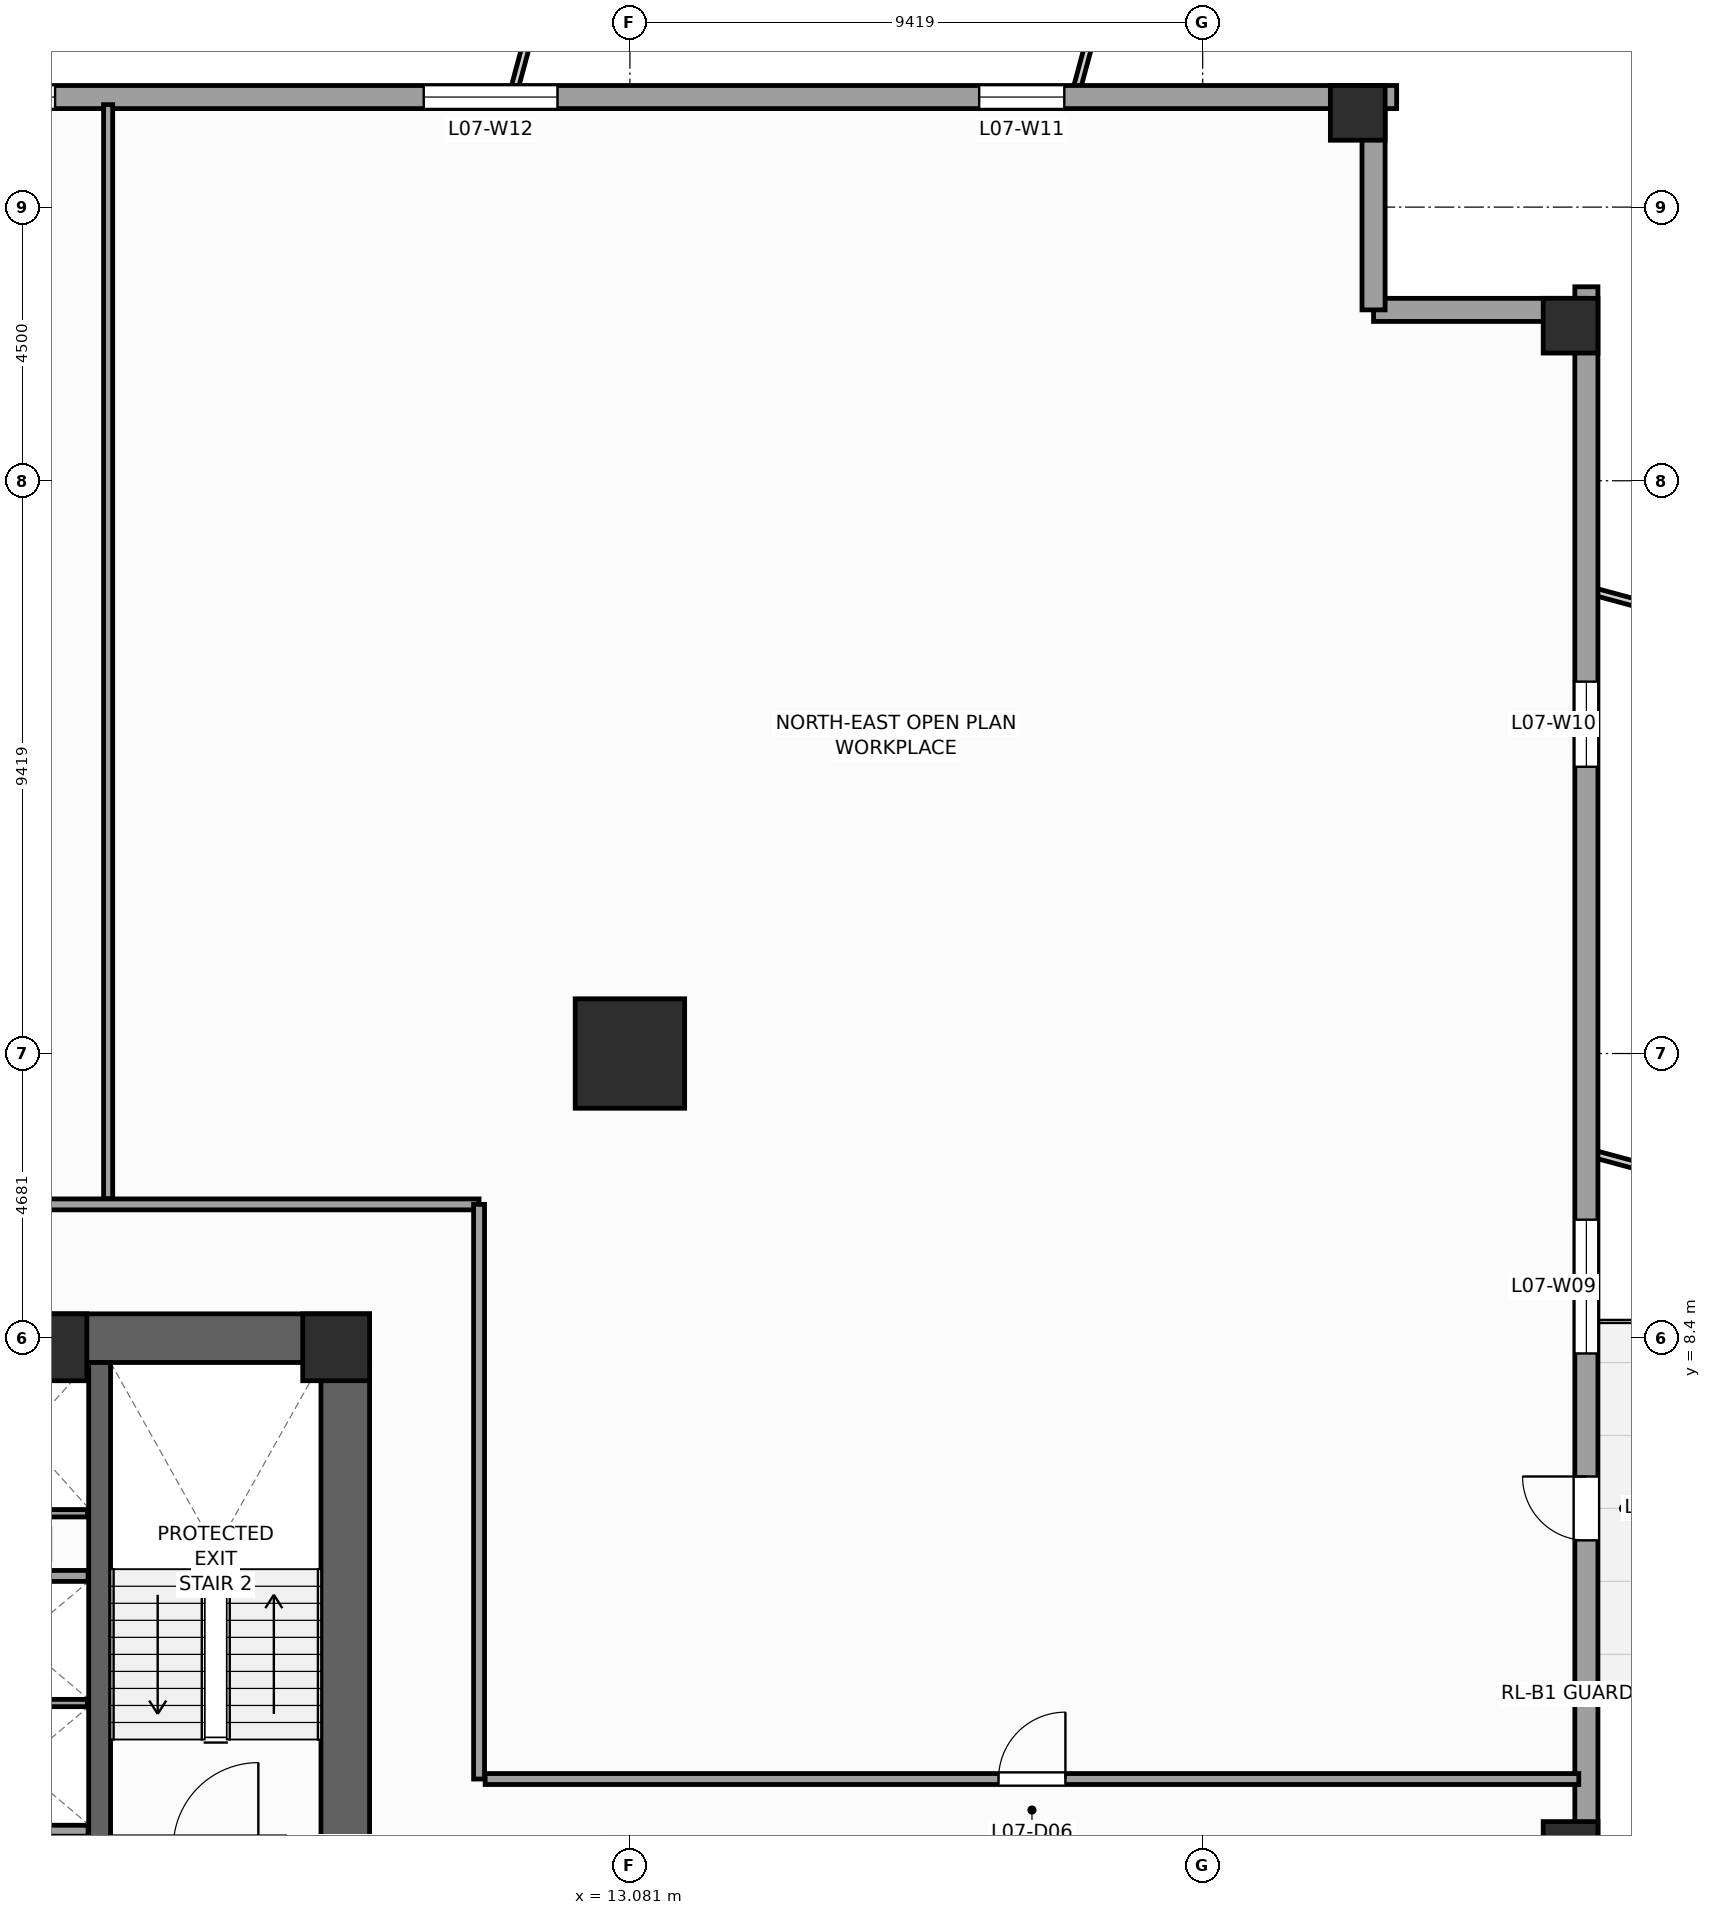
"""IFC4 building model, lengths in metres.
Left out: names, types, materials, properties, quantities, classifications, styles, units other than length and angle.
Written with IfcOpenShell. Run it as: python <this file> out.ifc"""

import sys

from ifc_helpers import new_model, si_unit, direction, frame, frame_2d, origin, origin_2d, place, context, subcontext, project, spatial, rectangle, extrude, source, transform, mapped, element, fill, save


model = new_model("IFC4")
c1 = context("Model", 3, precision=1e-05, world=origin(), true_north=direction((0.0, 1.0)))
c2 = subcontext(c1, "Body", "Model", "MODEL_VIEW")
j1 = project(units=[si_unit("LENGTHUNIT", "METRE"), si_unit("PLANEANGLEUNIT", "RADIAN")], contexts=[c1])
p1 = place(None, origin())
s1 = spatial("IfcSite", under=j1, at=p1, CompositionType="ELEMENT")
p2 = place(p1, origin())
s2 = spatial("IfcBuilding", under=s1, at=p2, CompositionType="ELEMENT")
p3 = place(p2, frame((0.0, 0.0, 34.0)))
s3 = spatial("IfcBuildingStorey", under=s2, at=p3, CompositionType="ELEMENT", Elevation=34.0)
p4 = place(p3, frame((-8.8, 8.4, 0.0), z_axis=(0.0, 0.0, 1.0), x_axis=(1.0, 0.0, 0.0)))
e1 = element("IfcWall", 1, at=p4, inside=s3, PredefinedType="SHEAR", context=c2, shape_type="SweptSolid", body=[
    extrude(rectangle(XDim=17.6, YDim=0.8, at=frame_2d((8.8, 0.0))), origin(), (0.0, 0.0, 1.0), 4.0),
])
p5 = place(p3, frame((8.4, -8.0, 0.0), z_axis=(0.0, 0.0, 1.0), x_axis=(0.0, 1.0, 0.0)))
e2 = element("IfcWall", 2, at=p5, inside=s3, PredefinedType="SHEAR", context=c2, shape_type="SweptSolid", body=[
    extrude(rectangle(XDim=16.0, YDim=0.8, at=frame_2d((8.0, 0.0))), origin(), (0.0, 0.0, 1.0), 4.0),
])
p6 = place(p5, frame((4.69, 0.0, 0.0)))
e3 = element("IfcOpeningElement", 3, at=p6, cuts=e2, PredefinedType="OPENING", context=c2, shape_type="SweptSolid", body=[
    extrude(rectangle(XDim=1.3, YDim=2.2, at=frame_2d((0.65, 1.1))), frame((0.0, 0.41, 0.0), z_axis=(0.0, -1.0, 0.0), x_axis=(1.0, 0.0, 0.0)), (0.0, 0.0, 1.0), 0.82),
])
p7 = place(p3, frame((4.36, -8.0, 0.0), z_axis=(0.0, 0.0, 1.0), x_axis=(0.0, 1.0, 0.0)))
e4 = element("IfcWall", 4, at=p7, inside=s3, PredefinedType="SHEAR", context=c2, shape_type="SweptSolid", body=[
    extrude(rectangle(XDim=16.0, YDim=0.36, at=frame_2d((8.0, 0.0))), origin(), (0.0, 0.0, 1.0), 4.0),
])
m1 = source(origin(), c2, "Body", "SweptSolid", [
    extrude(rectangle(XDim=1.1, YDim=1.1, at=origin_2d()), origin(), (0.0, 0.0, 1.0), 4.0),
])
for number, where, z_axis, x_axis in (
    (5, (8.25, 8.25, 0.0), (0.0, 0.0, 1.0), (1.0, 0.0, 0.0)),
    (6, (3.6, 8.25, 0.0), (0.0, 0.0, 1.0), (1.0, 0.0, 0.0)),
):
    element("IfcColumn", number, at=place(p3, frame(where, z_axis=z_axis, x_axis=x_axis)), inside=s3, PredefinedType="PILASTER", context=c2, shape_type="MappedRepresentation", body=[
        mapped(m1, transform((0.0, 0.0, 0.0), scale=1.0)),
    ])
m2 = source(origin(), c2, "Body", "SweptSolid", [
    extrude(rectangle(XDim=1.8, YDim=1.8, at=origin_2d()), origin(), (0.0, 0.0, 1.0), 4.0),
])
p8 = place(p3, frame((13.081, 13.081, 0.0), z_axis=(0.0, 0.0, 1.0), x_axis=(1.0, 0.0, 0.0)))
e7 = element("IfcColumn", 7, at=p8, inside=s3, PredefinedType="COLUMN", context=c2, shape_type="MappedRepresentation", body=[
    mapped(m2, transform((0.0, 0.0, 0.0), scale=1.0)),
])
m3 = source(origin(), c2, "Body", "SweptSolid", [
    extrude(rectangle(XDim=0.9, YDim=0.9, at=origin_2d()), origin(), (0.0, 0.0, 1.0), 4.0),
])
for number, where, z_axis, x_axis in (
    (8, (28.55, 0.0, 0.0), (0.0, 0.0, 1.0), (1.0, 0.0, 0.0)),
    (9, (28.55, 25.05, 0.0), (0.0, 0.0, 1.0), (1.0, 0.0, 0.0)),
    (10, (25.05, 28.55, 0.0), (0.0, 0.0, 1.0), (1.0, 0.0, 0.0)),
):
    element("IfcColumn", number, at=place(p3, frame(where, z_axis=z_axis, x_axis=x_axis)), inside=s3, PredefinedType="COLUMN", context=c2, shape_type="MappedRepresentation", body=[
        mapped(m3, transform((0.0, 0.0, 0.0), scale=1.0)),
    ])
p9 = place(p3, frame((28.81, -25.69, 0.0), z_axis=(0.0, 0.0, 1.0), x_axis=(0.0, 1.0, 0.0)))
e11 = element("IfcWall", 11, at=p9, inside=s3, PredefinedType="STANDARD", context=c2, shape_type="SweptSolid", body=[
    extrude(rectangle(XDim=51.38, YDim=0.38, at=frame_2d((25.69, 0.0))), origin(), (0.0, 0.0, 1.0), 3.12),
])
p10 = place(p9, frame((30.765, 0.0, 0.0)))
e12 = element("IfcOpeningElement", 12, at=p10, cuts=e11, PredefinedType="OPENING", context=c2, shape_type="SweptSolid", body=[
    extrude(rectangle(XDim=1.05, YDim=2.25, at=frame_2d((0.525, 1.125))), frame((0.0, 0.2, 0.0), z_axis=(0.0, -1.0, 0.0), x_axis=(1.0, 0.0, 0.0)), (0.0, 0.0, 1.0), 0.4),
])
p11 = place(p9, frame((5.466, 0.0, 0.49)))
e13 = element("IfcOpeningElement", 13, at=p11, cuts=e11, PredefinedType="OPENING", context=c2, shape_type="SweptSolid", body=[
    extrude(rectangle(XDim=1.4, YDim=2.4, at=frame_2d((0.7, 1.2))), frame((0.0, 0.2, 0.0), z_axis=(0.0, -1.0, 0.0), x_axis=(1.0, 0.0, 0.0)), (0.0, 0.0, 1.0), 0.4),
])
p12 = place(p9, frame((13.8, 0.0, 0.49)))
e14 = element("IfcOpeningElement", 14, at=p12, cuts=e11, PredefinedType="OPENING", context=c2, shape_type="SweptSolid", body=[
    extrude(rectangle(XDim=2.2, YDim=2.4, at=frame_2d((1.1, 1.2))), frame((0.0, 0.2, 0.0), z_axis=(0.0, -1.0, 0.0), x_axis=(1.0, 0.0, 0.0)), (0.0, 0.0, 1.0), 0.4),
])
p13 = place(p9, frame((21.312, 0.0, 0.49)))
e15 = element("IfcOpeningElement", 15, at=p13, cuts=e11, PredefinedType="OPENING", context=c2, shape_type="SweptSolid", body=[
    extrude(rectangle(XDim=2.2, YDim=2.4, at=frame_2d((1.1, 1.2))), frame((0.0, 0.2, 0.0), z_axis=(0.0, -1.0, 0.0), x_axis=(1.0, 0.0, 0.0)), (0.0, 0.0, 1.0), 0.4),
])
p14 = place(p9, frame((33.838, 0.0, 0.49)))
e16 = element("IfcOpeningElement", 16, at=p14, cuts=e11, PredefinedType="OPENING", context=c2, shape_type="SweptSolid", body=[
    extrude(rectangle(XDim=2.2, YDim=2.4, at=frame_2d((1.1, 1.2))), frame((0.0, 0.2, 0.0), z_axis=(0.0, -1.0, 0.0), x_axis=(1.0, 0.0, 0.0)), (0.0, 0.0, 1.0), 0.4),
])
p15 = place(p9, frame((43.487, 0.0, 0.49)))
e17 = element("IfcOpeningElement", 17, at=p15, cuts=e11, PredefinedType="OPENING", context=c2, shape_type="SweptSolid", body=[
    extrude(rectangle(XDim=1.4, YDim=2.4, at=frame_2d((0.7, 1.2))), frame((0.0, 0.2, 0.0), z_axis=(0.0, -1.0, 0.0), x_axis=(1.0, 0.0, 0.0)), (0.0, 0.0, 1.0), 0.4),
])
p16 = place(p3, frame((28.81, 25.31, 0.0), z_axis=(0.0, 0.0, 1.0), x_axis=(-1.0, 0.0, 0.0)))
e18 = element("IfcWall", 18, at=p16, inside=s3, PredefinedType="STANDARD", context=c2, shape_type="SweptSolid", body=[
    extrude(rectangle(XDim=3.5, YDim=0.38, at=frame_2d((1.75, 0.0))), origin(), (0.0, 0.0, 1.0), 3.72),
])
p17 = place(p3, frame((25.31, 25.31, 0.0), z_axis=(0.0, 0.0, 1.0), x_axis=(0.0, 1.0, 0.0)))
e19 = element("IfcWall", 19, at=p17, inside=s3, PredefinedType="STANDARD", context=c2, shape_type="SweptSolid", body=[
    extrude(rectangle(XDim=3.69, YDim=0.38, at=frame_2d((1.845, 0.0))), origin(), (0.0, 0.0, 1.0), 3.72),
])
p18 = place(p3, frame((25.69, 28.81, 0.0), z_axis=(0.0, 0.0, 1.0), x_axis=(-1.0, 0.0, 0.0)))
e20 = element("IfcWall", 20, at=p18, inside=s3, PredefinedType="STANDARD", context=c2, shape_type="SweptSolid", body=[
    extrude(rectangle(XDim=51.38, YDim=0.38, at=frame_2d((25.69, 0.0))), origin(), (0.0, 0.0, 1.0), 3.12),
])
p19 = place(p18, frame((5.466, 0.0, 0.49)))
e21 = element("IfcOpeningElement", 21, at=p19, cuts=e20, PredefinedType="OPENING", context=c2, shape_type="SweptSolid", body=[
    extrude(rectangle(XDim=1.4, YDim=2.4, at=frame_2d((0.7, 1.2))), frame((0.0, 0.2, 0.0), z_axis=(0.0, -1.0, 0.0), x_axis=(1.0, 0.0, 0.0)), (0.0, 0.0, 1.0), 0.4),
])
p20 = place(p18, frame((13.8, 0.0, 0.49)))
e22 = element("IfcOpeningElement", 22, at=p20, cuts=e20, PredefinedType="OPENING", context=c2, shape_type="SweptSolid", body=[
    extrude(rectangle(XDim=2.2, YDim=2.4, at=frame_2d((1.1, 1.2))), frame((0.0, 0.2, 0.0), z_axis=(0.0, -1.0, 0.0), x_axis=(1.0, 0.0, 0.0)), (0.0, 0.0, 1.0), 0.4),
])
p21 = place(p18, frame((22.062, 0.0, 0.49)))
e23 = element("IfcOpeningElement", 23, at=p21, cuts=e20, PredefinedType="OPENING", context=c2, shape_type="SweptSolid", body=[
    extrude(rectangle(XDim=2.2, YDim=2.4, at=frame_2d((1.1, 1.2))), frame((0.0, 0.2, 0.0), z_axis=(0.0, -1.0, 0.0), x_axis=(1.0, 0.0, 0.0)), (0.0, 0.0, 1.0), 0.4),
])
p22 = place(p18, frame((33.838, 0.0, 0.49)))
e24 = element("IfcOpeningElement", 24, at=p22, cuts=e20, PredefinedType="OPENING", context=c2, shape_type="SweptSolid", body=[
    extrude(rectangle(XDim=2.2, YDim=2.4, at=frame_2d((1.1, 1.2))), frame((0.0, 0.2, 0.0), z_axis=(0.0, -1.0, 0.0), x_axis=(1.0, 0.0, 0.0)), (0.0, 0.0, 1.0), 0.4),
])
p23 = place(p18, frame((43.487, 0.0, 0.49)))
e25 = element("IfcOpeningElement", 25, at=p23, cuts=e20, PredefinedType="OPENING", context=c2, shape_type="SweptSolid", body=[
    extrude(rectangle(XDim=1.4, YDim=2.4, at=frame_2d((0.7, 1.2))), frame((0.0, 0.2, 0.0), z_axis=(0.0, -1.0, 0.0), x_axis=(1.0, 0.0, 0.0)), (0.0, 0.0, 1.0), 0.4),
])
for number, where, z_axis, x_axis in (
    (26, (1.89, 0.3, 0.0), (0.0, 0.0, 1.0), (1.0, 0.0, 0.0)),
    (27, (1.89, 4.49, 0.0), (0.0, 0.0, 1.0), (1.0, 0.0, 0.0)),
):
    element("IfcWall", number, at=place(p3, frame(where, z_axis=z_axis, x_axis=x_axis)), inside=s3, PredefinedType="PARTITIONING", context=c2, shape_type="SweptSolid", body=[
        extrude(rectangle(XDim=2.28, YDim=0.18, at=frame_2d((1.14, 0.0))), origin(), (0.0, 0.0, 1.0), 3.72),
    ])
p24 = place(p3, frame((1.9, 2.4, 0.0), z_axis=(0.0, 0.0, 1.0), x_axis=(1.0, 0.0, 0.0)))
e28 = element("IfcWall", 28, at=p24, inside=s3, PredefinedType="PARTITIONING", context=c2, shape_type="SweptSolid", body=[
    extrude(rectangle(XDim=2.26, YDim=0.12, at=frame_2d((1.13, 0.0))), origin(), (0.0, 0.0, 1.0), 3.72),
])
p25 = place(p3, frame((2.06, 5.52, 0.0), z_axis=(0.0, 0.0, 1.0), x_axis=(1.0, 0.0, 0.0)))
e29 = element("IfcWall", 29, at=p25, inside=s3, PredefinedType="PARTITIONING", context=c2, shape_type="SweptSolid", body=[
    extrude(rectangle(XDim=2.1, YDim=0.12, at=frame_2d((1.05, 0.0))), origin(), (0.0, 0.0, 1.0), 3.72),
])
p26 = place(p3, frame((-10.6, 10.6, 0.0), z_axis=(0.0, 0.0, 1.0), x_axis=(1.0, 0.0, 0.0)))
e30 = element("IfcWall", 30, at=p26, inside=s3, PredefinedType="PARTITIONING", context=c2, shape_type="SweptSolid", body=[
    extrude(rectangle(XDim=21.2, YDim=0.18, at=frame_2d((10.6, 0.0))), origin(), (0.0, 0.0, 1.0), 3.72),
])
p27 = place(p26, frame((10.05, 0.0, 0.0)))
e31 = element("IfcOpeningElement", 31, at=p27, cuts=e30, PredefinedType="OPENING", context=c2, shape_type="SweptSolid", body=[
    extrude(rectangle(XDim=1.1, YDim=2.2, at=frame_2d((0.55, 1.1))), frame((0.0, 0.1, 0.0), z_axis=(0.0, -1.0, 0.0), x_axis=(1.0, 0.0, 0.0)), (0.0, 0.0, 1.0), 0.2),
])
p28 = place(p3, frame((10.6, 1.15, 0.0), z_axis=(0.0, 0.0, 1.0), x_axis=(0.0, 1.0, 0.0)))
e32 = element("IfcWall", 32, at=p28, inside=s3, PredefinedType="PARTITIONING", context=c2, shape_type="SweptSolid", body=[
    extrude(rectangle(XDim=9.45, YDim=0.18, at=frame_2d((4.725, 0.0))), origin(), (0.0, 0.0, 1.0), 3.72),
])
p29 = place(p3, frame((10.7, 1.15, 0.0), z_axis=(0.0, 0.0, 1.0), x_axis=(1.0, 0.0, 0.0)))
e33 = element("IfcWall", 33, at=p29, inside=s3, PredefinedType="PARTITIONING", context=c2, shape_type="SweptSolid", body=[
    extrude(rectangle(XDim=17.985, YDim=0.18, at=frame_2d((8.993, 0.0))), origin(), (0.0, 0.0, 1.0), 3.72),
])
p30 = place(p29, frame((8.442, 0.0, 0.0)))
e34 = element("IfcOpeningElement", 34, at=p30, cuts=e33, PredefinedType="OPENING", context=c2, shape_type="SweptSolid", body=[
    extrude(rectangle(XDim=1.1, YDim=2.2, at=frame_2d((0.55, 1.1))), frame((0.0, 0.1, 0.0), z_axis=(0.0, -1.0, 0.0), x_axis=(1.0, 0.0, 0.0)), (0.0, 0.0, 1.0), 0.2),
])
p31 = place(p3, frame((4.5, 10.695, 0.0), z_axis=(0.0, 0.0, 1.0), x_axis=(0.0, 1.0, 0.0)))
e35 = element("IfcWall", 35, at=p31, inside=s3, PredefinedType="PARTITIONING", context=c2, shape_type="SweptSolid", body=[
    extrude(rectangle(XDim=17.99, YDim=0.15, at=frame_2d((8.995, 0.0))), origin(), (0.0, 0.0, 1.0), 3.72),
])
m4 = source(origin(), c2, "Body", "SweptSolid", [
    extrude(rectangle(XDim=1.05, YDim=2.25, at=frame_2d((0.525, 1.125))), frame((0.0, 0.025, 0.0), z_axis=(0.0, -1.0, 0.0), x_axis=(1.0, 0.0, 0.0)), (0.0, 0.0, 1.0), 0.05),
])
p32 = place(p10, origin())
e36 = element("IfcDoor", 36, at=p32, inside=s3, OperationType="SINGLE_SWING_RIGHT", PredefinedType="DOOR", context=c2, shape_type="MappedRepresentation", body=[
    mapped(m4, transform((0.0, 0.0, 0.0), scale=1.0)),
])
fill(e12, e36)
m5 = source(origin(), c2, "Body", "SweptSolid", [
    extrude(rectangle(XDim=2.2, YDim=2.4, at=frame_2d((1.1, 1.2))), frame((0.0, 0.03, 0.0), z_axis=(0.0, -1.0, 0.0), x_axis=(1.0, 0.0, 0.0)), (0.0, 0.0, 1.0), 0.06),
])
p33 = place(p14, origin())
e37 = element("IfcWindow", 37, at=p33, inside=s3, PartitioningType="SINGLE_PANEL", PredefinedType="WINDOW", context=c2, shape_type="MappedRepresentation", body=[
    mapped(m5, transform((0.0, 0.0, 0.0), scale=1.0)),
])
fill(e16, e37)
m6 = source(origin(), c2, "Body", "SweptSolid", [
    extrude(rectangle(XDim=1.4, YDim=2.4, at=frame_2d((0.7, 1.2))), frame((0.0, 0.03, 0.0), z_axis=(0.0, -1.0, 0.0), x_axis=(1.0, 0.0, 0.0)), (0.0, 0.0, 1.0), 0.06),
])
p34 = place(p15, origin())
e38 = element("IfcWindow", 38, at=p34, inside=s3, PartitioningType="SINGLE_PANEL", PredefinedType="WINDOW", context=c2, shape_type="MappedRepresentation", body=[
    mapped(m6, transform((0.0, 0.0, 0.0), scale=1.0)),
])
fill(e17, e38)
p35 = place(p19, origin())
e39 = element("IfcWindow", 39, at=p35, inside=s3, PartitioningType="SINGLE_PANEL", PredefinedType="WINDOW", context=c2, shape_type="MappedRepresentation", body=[
    mapped(m6, transform((0.0, 0.0, 0.0), scale=1.0)),
])
fill(e21, e39)
p36 = place(p20, origin())
e40 = element("IfcWindow", 40, at=p36, inside=s3, PartitioningType="SINGLE_PANEL", PredefinedType="WINDOW", context=c2, shape_type="MappedRepresentation", body=[
    mapped(m5, transform((0.0, 0.0, 0.0), scale=1.0)),
])
fill(e22, e40)
p37 = place(p21, origin())
e41 = element("IfcWindow", 41, at=p37, inside=s3, PartitioningType="SINGLE_PANEL", PredefinedType="WINDOW", context=c2, shape_type="MappedRepresentation", body=[
    mapped(m5, transform((0.0, 0.0, 0.0), scale=1.0)),
])
fill(e23, e41)
m7 = source(origin(), c2, "Body", "SweptSolid", [
    extrude(rectangle(XDim=1.1, YDim=2.2, at=frame_2d((0.55, 1.1))), frame((0.0, 0.025, 0.0), z_axis=(0.0, -1.0, 0.0), x_axis=(1.0, 0.0, 0.0)), (0.0, 0.0, 1.0), 0.05),
])
p38 = place(p30, origin())
e42 = element("IfcDoor", 42, at=p38, inside=s3, OperationType="SINGLE_SWING_RIGHT", PredefinedType="DOOR", context=c2, shape_type="MappedRepresentation", body=[
    mapped(m7, transform((0.0, 0.0, 0.0), scale=1.0)),
])
fill(e34, e42)
save(model, sys.argv[1])
